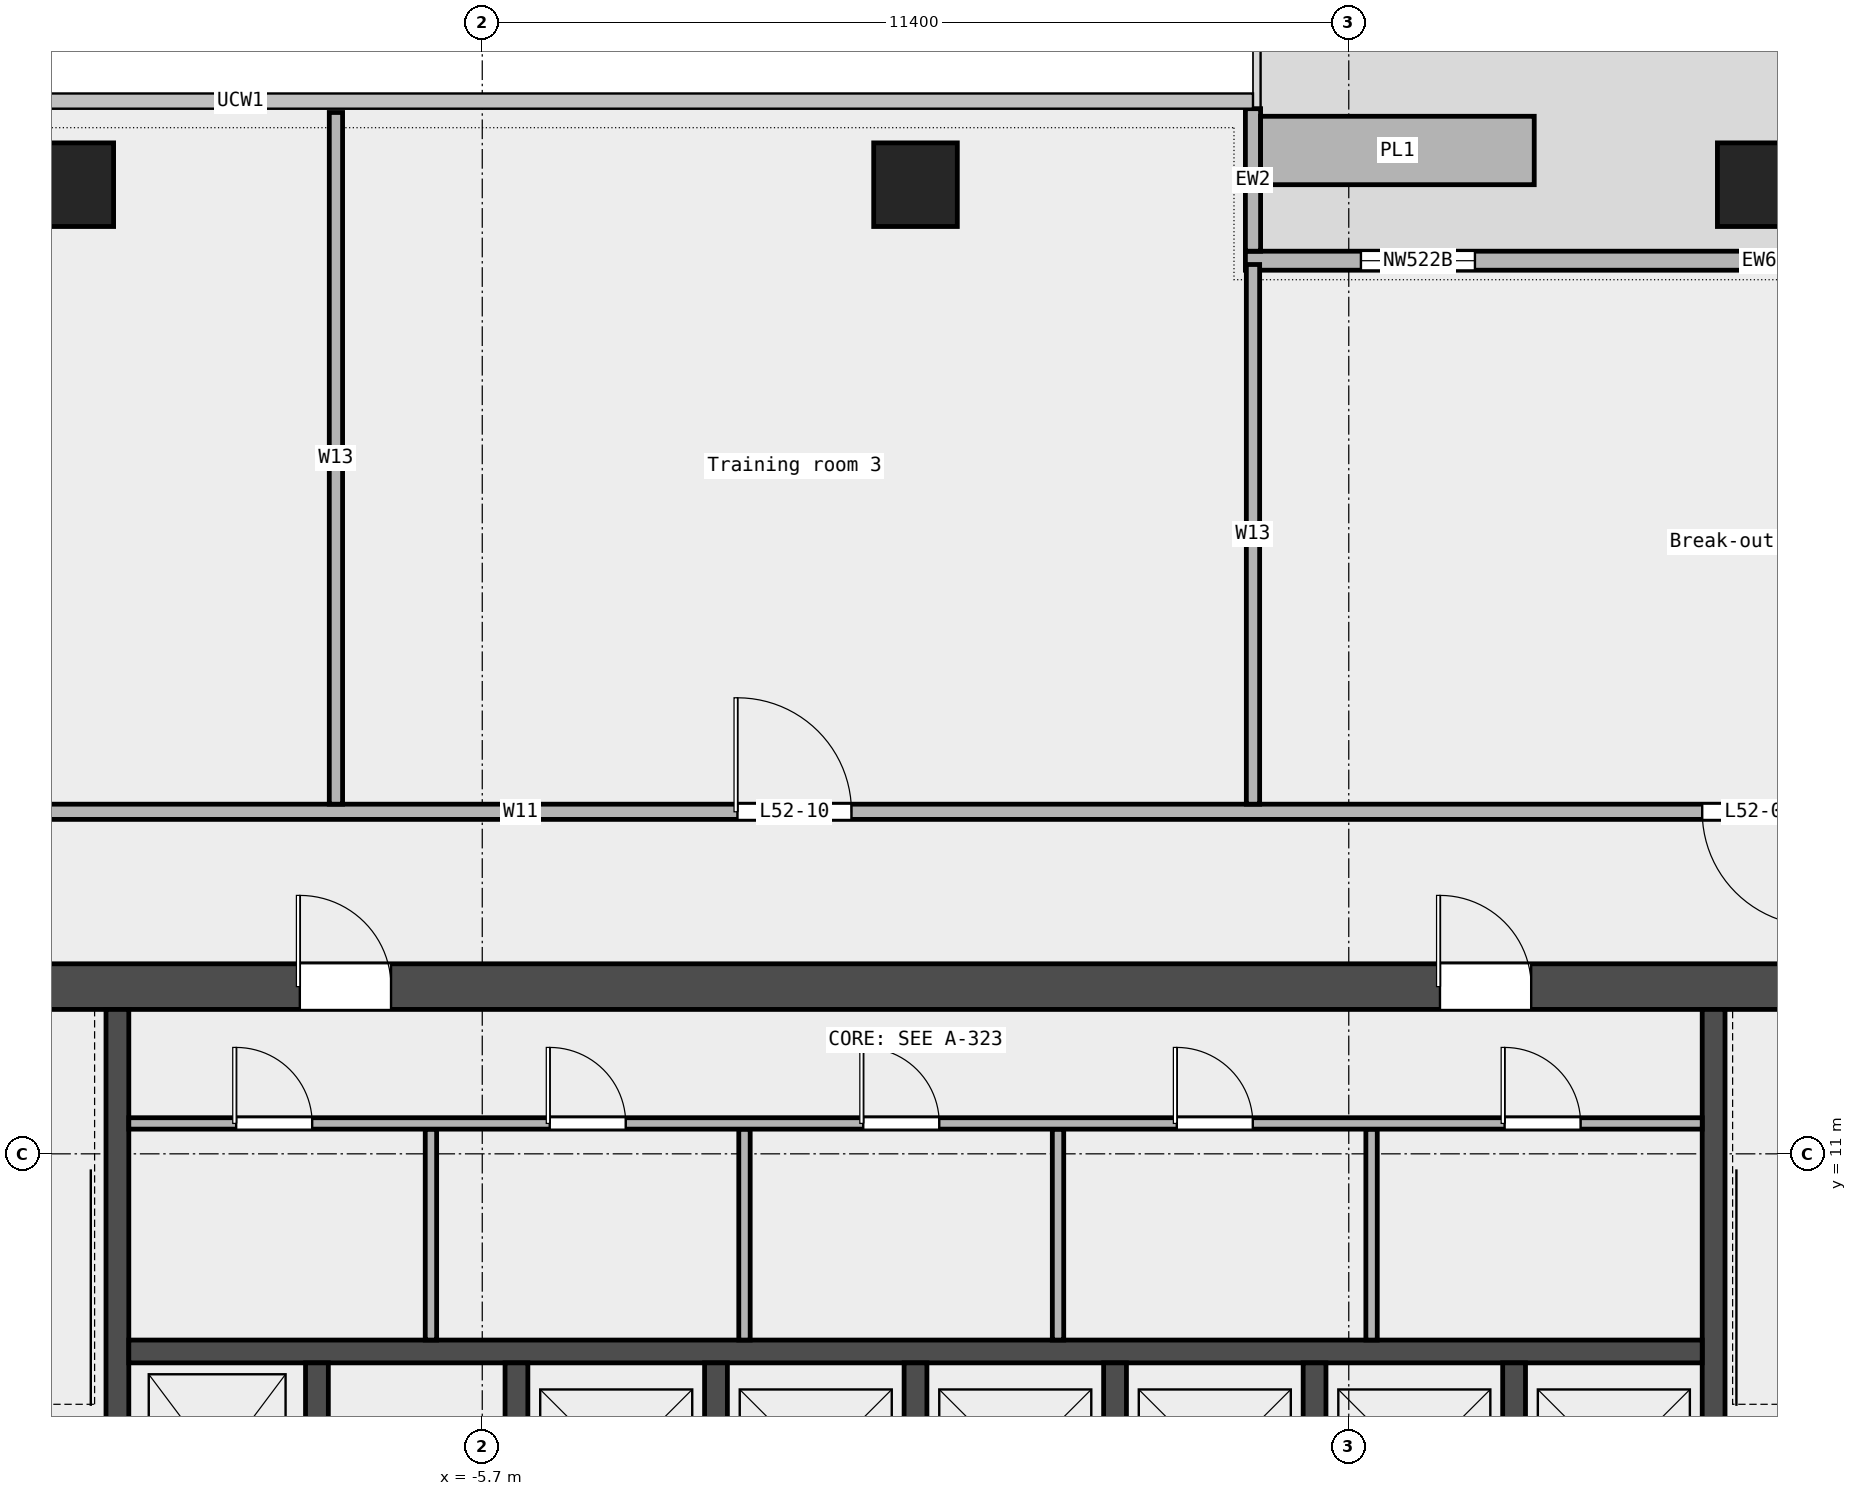
"""IFC4 building model, lengths in metres.
Left out: names, types, materials, properties, quantities, classifications, styles, units other than length and angle.
Written with IfcOpenShell. Run it as: python <this file> out.ifc"""

import sys

from ifc_helpers import new_model, si_unit, direction, frame, frame_2d, origin, origin_2d, place, context, subcontext, project, spatial, rectangle, extrude, element, fill, save


model = new_model("IFC4")
c1 = context("Model", 3, precision=1e-05, world=origin(), true_north=direction((0.0, 1.0)))
c2 = subcontext(c1, "Body", "Model", "MODEL_VIEW")
j1 = project(units=[si_unit("LENGTHUNIT", "METRE"), si_unit("PLANEANGLEUNIT", "RADIAN")], contexts=[c1])
p1 = place(None, origin())
s1 = spatial("IfcSite", under=j1, at=p1, CompositionType="ELEMENT")
p2 = place(p1, origin())
s2 = spatial("IfcBuilding", under=s1, at=p2, CompositionType="ELEMENT")
p3 = place(p2, frame((0.0, 0.0, 243.0)))
s3 = spatial("IfcBuildingStorey", under=s2, at=p3, CompositionType="ELEMENT", Elevation=243.0)
for number, where, z_axis, x_axis in (
    (1, (11.1, 23.75, 0.0), (0.0, 0.0, 1.0), (1.0, 0.0, 0.0)),
    (2, (0.0, 23.75, 0.0), (0.0, 0.0, 1.0), (1.0, 0.0, 0.0)),
    (3, (-11.1, 23.75, 0.0), (0.0, 0.0, 1.0), (1.0, 0.0, 0.0)),
):
    element("IfcColumn", number, at=place(p3, frame(where, z_axis=z_axis, x_axis=x_axis)), inside=s3, PredefinedType="COLUMN", context=c2, shape_type="SweptSolid", body=[
        extrude(rectangle(XDim=1.1, YDim=1.1, at=origin_2d()), origin(), (0.0, 0.0, 1.0), 3.6),
    ])
p4 = place(p3, frame((17.86, 22.75, 0.0), z_axis=(0.0, 0.0, 1.0), x_axis=(-1.0, 0.0, 0.0)))
e4 = element("IfcWall", 4, at=p4, inside=s3, PredefinedType="STANDARD", context=c2, shape_type="SweptSolid", body=[
    extrude(rectangle(XDim=13.52, YDim=0.25, at=frame_2d((6.76, 0.0))), origin(), (0.0, 0.0, 1.0), 3.6),
])
p5 = place(p4, frame((1.5, 0.0, 0.45)))
e5 = element("IfcOpeningElement", 5, at=p5, cuts=e4, PredefinedType="OPENING", context=c2, shape_type="SweptSolid", body=[
    extrude(rectangle(XDim=1.5, YDim=2.4, at=frame_2d((0.75, 1.2))), frame((0.0, 0.137, 0.0), z_axis=(0.0, -1.0, 0.0), x_axis=(1.0, 0.0, 0.0)), (0.0, 0.0, 1.0), 0.274),
])
p6 = place(p4, frame((4.0, 0.0, 0.0)))
e6 = element("IfcOpeningElement", 6, at=p6, cuts=e4, PredefinedType="OPENING", context=c2, shape_type="SweptSolid", body=[
    extrude(rectangle(XDim=1.8, YDim=2.4, at=frame_2d((0.9, 1.2))), frame((0.0, 0.137, 0.0), z_axis=(0.0, -1.0, 0.0), x_axis=(1.0, 0.0, 0.0)), (0.0, 0.0, 1.0), 0.274),
])
p7 = place(p4, frame((10.5, 0.0, 0.45)))
e7 = element("IfcOpeningElement", 7, at=p7, cuts=e4, PredefinedType="OPENING", context=c2, shape_type="SweptSolid", body=[
    extrude(rectangle(XDim=1.5, YDim=2.4, at=frame_2d((0.75, 1.2))), frame((0.0, 0.137, 0.0), z_axis=(0.0, -1.0, 0.0), x_axis=(1.0, 0.0, 0.0)), (0.0, 0.0, 1.0), 0.274),
])
p8 = place(p3, frame((4.44, 24.75, 0.0), z_axis=(0.0, 0.0, 1.0), x_axis=(0.0, -1.0, 0.0)))
e8 = element("IfcWall", 8, at=p8, inside=s3, PredefinedType="STANDARD", context=c2, shape_type="SweptSolid", body=[
    extrude(rectangle(XDim=1.875, YDim=0.2, at=frame_2d((0.938, 0.0))), origin(), (0.0, 0.0, 1.0), 3.6),
])
p9 = place(p3, frame((8.14, 24.2, 0.0), z_axis=(0.0, 0.0, 1.0), x_axis=(-1.0, 0.0, 0.0)))
e9 = element("IfcWall", 9, at=p9, inside=s3, PredefinedType="STANDARD", context=c2, shape_type="SweptSolid", body=[
    extrude(rectangle(XDim=3.6, YDim=0.9, at=frame_2d((1.8, 0.0))), origin(), (0.0, 0.0, 1.0), 0.7),
])
p10 = place(p3, frame((-28.15, 15.5, 0.0), z_axis=(0.0, 0.0, 1.0), x_axis=(1.0, 0.0, 0.0)))
e10 = element("IfcWall", 10, at=p10, inside=s3, PredefinedType="PARTITIONING", context=c2, shape_type="SweptSolid", body=[
    extrude(rectangle(XDim=45.91, YDim=0.2, at=frame_2d((22.955, 0.0))), origin(), (0.0, 0.0, 1.0), 3.6),
])
p11 = place(p10, frame((38.5, 0.0, 0.0)))
e11 = element("IfcOpeningElement", 11, at=p11, cuts=e10, PredefinedType="OPENING", context=c2, shape_type="SweptSolid", body=[
    extrude(rectangle(XDim=1.5, YDim=2.1, at=frame_2d((0.75, 1.05))), frame((0.0, 0.112, 0.0), z_axis=(0.0, -1.0, 0.0), x_axis=(1.0, 0.0, 0.0)), (0.0, 0.0, 1.0), 0.224),
])
p12 = place(p10, frame((9.462, 0.0, 0.0)))
e12 = element("IfcOpeningElement", 12, at=p12, cuts=e10, PredefinedType="OPENING", context=c2, shape_type="SweptSolid", body=[
    extrude(rectangle(XDim=1.8, YDim=2.1, at=frame_2d((0.9, 1.05))), frame((0.0, 0.112, 0.0), z_axis=(0.0, -1.0, 0.0), x_axis=(1.0, 0.0, 0.0)), (0.0, 0.0, 1.0), 0.224),
])
p13 = place(p10, frame((25.808, 0.0, 0.0)))
e13 = element("IfcOpeningElement", 13, at=p13, cuts=e10, PredefinedType="OPENING", context=c2, shape_type="SweptSolid", body=[
    extrude(rectangle(XDim=1.5, YDim=2.1, at=frame_2d((0.75, 1.05))), frame((0.0, 0.112, 0.0), z_axis=(0.0, -1.0, 0.0), x_axis=(1.0, 0.0, 0.0)), (0.0, 0.0, 1.0), 0.224),
])
p14 = place(p3, frame((-7.625, 15.6, 0.0), z_axis=(0.0, 0.0, 1.0), x_axis=(0.0, 1.0, 0.0)))
e14 = element("IfcWall", 14, at=p14, inside=s3, PredefinedType="PARTITIONING", context=c2, shape_type="SweptSolid", body=[
    extrude(rectangle(XDim=9.1, YDim=0.175, at=frame_2d((4.55, 0.0))), origin(), (0.0, 0.0, 1.0), 3.6),
])
p15 = place(p3, frame((4.44, 15.6, 0.0), z_axis=(0.0, 0.0, 1.0), x_axis=(0.0, 1.0, 0.0)))
e15 = element("IfcWall", 15, at=p15, inside=s3, PredefinedType="PARTITIONING", context=c2, shape_type="SweptSolid", body=[
    extrude(rectangle(XDim=7.1, YDim=0.175, at=frame_2d((3.55, 0.0))), origin(), (0.0, 0.0, 1.0), 3.6),
])
p16 = place(p3, frame((-14.4, 13.2, 0.0), z_axis=(0.0, 0.0, 1.0), x_axis=(1.0, 0.0, 0.0)))
e16 = element("IfcWall", 16, at=p16, inside=s3, PredefinedType="SHEAR", context=c2, shape_type="SweptSolid", body=[
    extrude(rectangle(XDim=28.8, YDim=0.6, at=frame_2d((14.4, 0.0))), origin(), (0.0, 0.0, 1.0), 3.7),
])
p17 = place(p16, frame((6.3, 0.0, 0.0)))
e17 = element("IfcOpeningElement", 17, at=p17, cuts=e16, PredefinedType="OPENING", context=c2, shape_type="SweptSolid", body=[
    extrude(rectangle(XDim=1.2, YDim=2.1, at=frame_2d((0.6, 1.05))), frame((0.0, 0.312, 0.0), z_axis=(0.0, -1.0, 0.0), x_axis=(1.0, 0.0, 0.0)), (0.0, 0.0, 1.0), 0.624),
])
p18 = place(p16, frame((21.3, 0.0, 0.0)))
e18 = element("IfcOpeningElement", 18, at=p18, cuts=e16, PredefinedType="OPENING", context=c2, shape_type="SweptSolid", body=[
    extrude(rectangle(XDim=1.2, YDim=2.1, at=frame_2d((0.6, 1.05))), frame((0.0, 0.312, 0.0), z_axis=(0.0, -1.0, 0.0), x_axis=(1.0, 0.0, 0.0)), (0.0, 0.0, 1.0), 0.624),
])
for number, where, z_axis, x_axis in (
    (19, (-10.5, 5.25, 0.0), (0.0, 0.0, 1.0), (0.0, 1.0, 0.0)),
    (20, (10.5, 5.25, 0.0), (0.0, 0.0, 1.0), (0.0, 1.0, 0.0)),
):
    element("IfcWall", number, at=place(p3, frame(where, z_axis=z_axis, x_axis=x_axis)), inside=s3, PredefinedType="SHEAR", context=c2, shape_type="SweptSolid", body=[
        extrude(rectangle(XDim=7.65, YDim=0.3, at=frame_2d((3.825, 0.0))), origin(), (0.0, 0.0, 1.0), 3.7),
    ])
p19 = place(p3, frame((-10.35, 8.4, 0.0), z_axis=(0.0, 0.0, 1.0), x_axis=(1.0, 0.0, 0.0)))
e21 = element("IfcWall", 21, at=p19, inside=s3, PredefinedType="SOLIDWALL", context=c2, shape_type="SweptSolid", body=[
    extrude(rectangle(XDim=20.7, YDim=0.3, at=frame_2d((10.35, 0.0))), origin(), (0.0, 0.0, 1.0), 3.7),
])
for number, where, z_axis, x_axis in (
    (22, (-7.875, 5.55, 0.0), (0.0, 0.0, 1.0), (0.0, 1.0, 0.0)),
    (23, (-5.25, 5.55, 0.0), (0.0, 0.0, 1.0), (0.0, 1.0, 0.0)),
    (24, (-2.625, 5.55, 0.0), (0.0, 0.0, 1.0), (0.0, 1.0, 0.0)),
    (25, (0.0, 5.55, 0.0), (0.0, 0.0, 1.0), (0.0, 1.0, 0.0)),
    (26, (2.625, 5.55, 0.0), (0.0, 0.0, 1.0), (0.0, 1.0, 0.0)),
    (27, (5.25, 5.55, 0.0), (0.0, 0.0, 1.0), (0.0, 1.0, 0.0)),
    (28, (7.875, 5.55, 0.0), (0.0, 0.0, 1.0), (0.0, 1.0, 0.0)),
):
    element("IfcWall", number, at=place(p3, frame(where, z_axis=z_axis, x_axis=x_axis)), inside=s3, PredefinedType="SOLIDWALL", context=c2, shape_type="SweptSolid", body=[
        extrude(rectangle(XDim=2.7, YDim=0.3, at=frame_2d((1.35, 0.0))), origin(), (0.0, 0.0, 1.0), 3.7),
    ])
for number, where, z_axis, x_axis in (
    (29, (-6.375, 8.55, 0.0), (0.0, 0.0, 1.0), (0.0, 1.0, 0.0)),
    (30, (-2.25, 8.55, 0.0), (0.0, 0.0, 1.0), (0.0, 1.0, 0.0)),
    (31, (1.875, 8.55, 0.0), (0.0, 0.0, 1.0), (0.0, 1.0, 0.0)),
    (32, (6.0, 8.55, 0.0), (0.0, 0.0, 1.0), (0.0, 1.0, 0.0)),
):
    element("IfcWall", number, at=place(p3, frame(where, z_axis=z_axis, x_axis=x_axis)), inside=s3, PredefinedType="PARTITIONING", context=c2, shape_type="SweptSolid", body=[
        extrude(rectangle(XDim=2.775, YDim=0.15, at=frame_2d((1.387, 0.0))), origin(), (0.0, 0.0, 1.0), 3.7),
    ])
p20 = place(p3, frame((-10.35, 11.4, 0.0), z_axis=(0.0, 0.0, 1.0), x_axis=(1.0, 0.0, 0.0)))
e33 = element("IfcWall", 33, at=p20, inside=s3, PredefinedType="PARTITIONING", context=c2, shape_type="SweptSolid", body=[
    extrude(rectangle(XDim=20.7, YDim=0.15, at=frame_2d((10.35, 0.0))), origin(), (0.0, 0.0, 1.0), 3.7),
])
p21 = place(p20, frame((1.413, 0.0, 0.0)))
e34 = element("IfcOpeningElement", 34, at=p21, cuts=e33, PredefinedType="OPENING", context=c2, shape_type="SweptSolid", body=[
    extrude(rectangle(XDim=1.0, YDim=2.1, at=frame_2d((0.5, 1.05))), frame((0.0, 0.087, 0.0), z_axis=(0.0, -1.0, 0.0), x_axis=(1.0, 0.0, 0.0)), (0.0, 0.0, 1.0), 0.174),
])
p22 = place(p20, frame((5.538, 0.0, 0.0)))
e35 = element("IfcOpeningElement", 35, at=p22, cuts=e33, PredefinedType="OPENING", context=c2, shape_type="SweptSolid", body=[
    extrude(rectangle(XDim=1.0, YDim=2.1, at=frame_2d((0.5, 1.05))), frame((0.0, 0.087, 0.0), z_axis=(0.0, -1.0, 0.0), x_axis=(1.0, 0.0, 0.0)), (0.0, 0.0, 1.0), 0.174),
])
p23 = place(p20, frame((9.663, 0.0, 0.0)))
e36 = element("IfcOpeningElement", 36, at=p23, cuts=e33, PredefinedType="OPENING", context=c2, shape_type="SweptSolid", body=[
    extrude(rectangle(XDim=1.0, YDim=2.1, at=frame_2d((0.5, 1.05))), frame((0.0, 0.087, 0.0), z_axis=(0.0, -1.0, 0.0), x_axis=(1.0, 0.0, 0.0)), (0.0, 0.0, 1.0), 0.174),
])
p24 = place(p20, frame((13.788, 0.0, 0.0)))
e37 = element("IfcOpeningElement", 37, at=p24, cuts=e33, PredefinedType="OPENING", context=c2, shape_type="SweptSolid", body=[
    extrude(rectangle(XDim=1.0, YDim=2.1, at=frame_2d((0.5, 1.05))), frame((0.0, 0.087, 0.0), z_axis=(0.0, -1.0, 0.0), x_axis=(1.0, 0.0, 0.0)), (0.0, 0.0, 1.0), 0.174),
])
p25 = place(p20, frame((18.1, 0.0, 0.0)))
e38 = element("IfcOpeningElement", 38, at=p25, cuts=e33, PredefinedType="OPENING", context=c2, shape_type="SweptSolid", body=[
    extrude(rectangle(XDim=1.0, YDim=2.1, at=frame_2d((0.5, 1.05))), frame((0.0, 0.087, 0.0), z_axis=(0.0, -1.0, 0.0), x_axis=(1.0, 0.0, 0.0)), (0.0, 0.0, 1.0), 0.174),
])
p26 = place(p7, origin())
e39 = element("IfcWindow", 39, at=p26, inside=s3, PartitioningType="SINGLE_PANEL", PredefinedType="WINDOW", context=c2, shape_type="SweptSolid", body=[
    extrude(rectangle(XDim=1.5, YDim=2.4, at=frame_2d((0.75, 1.2))), frame((0.0, 0.03, 0.0), z_axis=(0.0, -1.0, 0.0), x_axis=(1.0, 0.0, 0.0)), (0.0, 0.0, 1.0), 0.06),
])
fill(e7, e39)
p27 = place(p11, origin())
e40 = element("IfcDoor", 40, at=p27, inside=s3, OperationType="DOUBLE_DOOR_SINGLE_SWING", PredefinedType="DOOR", context=c2, shape_type="SweptSolid", body=[
    extrude(rectangle(XDim=1.5, YDim=2.1, at=frame_2d((0.75, 1.05))), frame((0.0, 0.025, 0.0), z_axis=(0.0, -1.0, 0.0), x_axis=(1.0, 0.0, 0.0)), (0.0, 0.0, 1.0), 0.05),
])
fill(e11, e40)
p28 = place(p13, origin())
e41 = element("IfcDoor", 41, at=p28, inside=s3, OperationType="DOUBLE_DOOR_SINGLE_SWING", PredefinedType="DOOR", context=c2, shape_type="SweptSolid", body=[
    extrude(rectangle(XDim=1.5, YDim=2.1, at=frame_2d((0.75, 1.05))), frame((0.0, 0.025, 0.0), z_axis=(0.0, -1.0, 0.0), x_axis=(1.0, 0.0, 0.0)), (0.0, 0.0, 1.0), 0.05),
])
fill(e13, e41)
p29 = place(p21, origin())
e42 = element("IfcDoor", 42, at=p29, inside=s3, OperationType="SINGLE_SWING_LEFT", PredefinedType="DOOR", context=c2, shape_type="SweptSolid", body=[
    extrude(rectangle(XDim=1.0, YDim=2.1, at=frame_2d((0.5, 1.05))), frame((0.0, 0.025, 0.0), z_axis=(0.0, -1.0, 0.0), x_axis=(1.0, 0.0, 0.0)), (0.0, 0.0, 1.0), 0.05),
])
fill(e34, e42)
p30 = place(p22, origin())
e43 = element("IfcDoor", 43, at=p30, inside=s3, OperationType="SINGLE_SWING_LEFT", PredefinedType="DOOR", context=c2, shape_type="SweptSolid", body=[
    extrude(rectangle(XDim=1.0, YDim=2.1, at=frame_2d((0.5, 1.05))), frame((0.0, 0.025, 0.0), z_axis=(0.0, -1.0, 0.0), x_axis=(1.0, 0.0, 0.0)), (0.0, 0.0, 1.0), 0.05),
])
fill(e35, e43)
p31 = place(p23, origin())
e44 = element("IfcDoor", 44, at=p31, inside=s3, OperationType="SINGLE_SWING_LEFT", PredefinedType="DOOR", context=c2, shape_type="SweptSolid", body=[
    extrude(rectangle(XDim=1.0, YDim=2.1, at=frame_2d((0.5, 1.05))), frame((0.0, 0.025, 0.0), z_axis=(0.0, -1.0, 0.0), x_axis=(1.0, 0.0, 0.0)), (0.0, 0.0, 1.0), 0.05),
])
fill(e36, e44)
p32 = place(p24, origin())
e45 = element("IfcDoor", 45, at=p32, inside=s3, OperationType="SINGLE_SWING_LEFT", PredefinedType="DOOR", context=c2, shape_type="SweptSolid", body=[
    extrude(rectangle(XDim=1.0, YDim=2.1, at=frame_2d((0.5, 1.05))), frame((0.0, 0.025, 0.0), z_axis=(0.0, -1.0, 0.0), x_axis=(1.0, 0.0, 0.0)), (0.0, 0.0, 1.0), 0.05),
])
fill(e37, e45)
p33 = place(p25, origin())
e46 = element("IfcDoor", 46, at=p33, inside=s3, OperationType="SINGLE_SWING_LEFT", PredefinedType="DOOR", context=c2, shape_type="SweptSolid", body=[
    extrude(rectangle(XDim=1.0, YDim=2.1, at=frame_2d((0.5, 1.05))), frame((0.0, 0.025, 0.0), z_axis=(0.0, -1.0, 0.0), x_axis=(1.0, 0.0, 0.0)), (0.0, 0.0, 1.0), 0.05),
])
fill(e38, e46)
p34 = place(p17, origin())
e47 = element("IfcDoor", 47, at=p34, inside=s3, OperationType="SINGLE_SWING_LEFT", PredefinedType="DOOR", context=c2, shape_type="SweptSolid", body=[
    extrude(rectangle(XDim=1.2, YDim=2.1, at=frame_2d((0.6, 1.05))), frame((0.0, 0.025, 0.0), z_axis=(0.0, -1.0, 0.0), x_axis=(1.0, 0.0, 0.0)), (0.0, 0.0, 1.0), 0.05),
])
fill(e17, e47)
p35 = place(p18, origin())
e48 = element("IfcDoor", 48, at=p35, inside=s3, OperationType="SINGLE_SWING_RIGHT", PredefinedType="DOOR", context=c2, shape_type="SweptSolid", body=[
    extrude(rectangle(XDim=1.2, YDim=2.1, at=frame_2d((0.6, 1.05))), frame((0.0, 0.025, 0.0), z_axis=(0.0, -1.0, 0.0), x_axis=(1.0, 0.0, 0.0)), (0.0, 0.0, 1.0), 0.05),
])
fill(e18, e48)
save(model, sys.argv[1])
